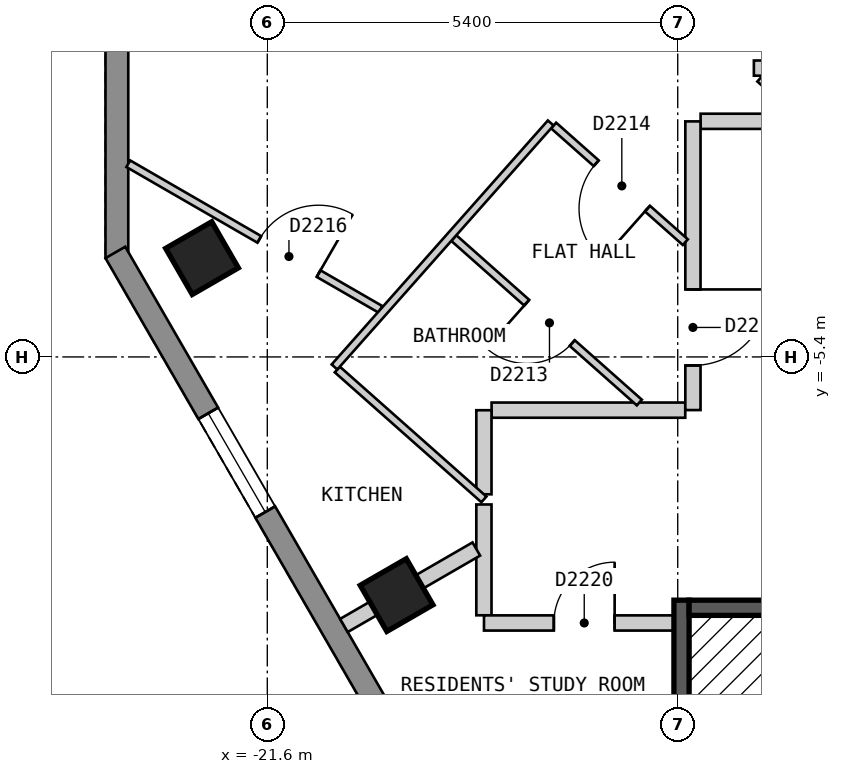
"""IFC4 building model, lengths in metres.
Left out: names, types, materials, properties, quantities, classifications, styles, units other than length and angle.
Written with IfcOpenShell. Run it as: python <this file> out.ifc"""

import sys

from ifc_helpers import new_model, si_unit, direction, frame, frame_2d, origin, origin_2d, place, context, subcontext, project, spatial, polyline, rectangle, outline, extrude, element, fill, save


model = new_model("IFC4")
c1 = context("Model", 3, precision=1e-05, world=origin(), true_north=direction((0.0, 1.0)))
c2 = subcontext(c1, "Body", "Model", "MODEL_VIEW")
j1 = project(units=[si_unit("LENGTHUNIT", "METRE"), si_unit("PLANEANGLEUNIT", "RADIAN")], contexts=[c1])
p1 = place(None, origin())
s1 = spatial("IfcSite", under=j1, at=p1, CompositionType="ELEMENT")
p2 = place(p1, origin())
s2 = spatial("IfcBuilding", under=s1, at=p2, CompositionType="ELEMENT")
p3 = place(p2, frame((0.0, 0.0, 229.8)))
s3 = spatial("IfcBuildingStorey", under=s2, at=p3, CompositionType="ELEMENT", Elevation=229.8)
for number, where, z_axis, x_axis in (
    (1, (-22.459, -4.1, 0.0), (0.0, 0.0, 1.0), (0.5, -0.866, 0.0)),
    (2, (-19.899, -8.533, 0.0), (0.0, 0.0, 1.0), (0.5, -0.866, 0.0)),
):
    element("IfcColumn", number, at=place(p3, frame(where, z_axis=z_axis, x_axis=x_axis)), inside=s3, PredefinedType="COLUMN", context=c2, shape_type="SweptSolid", body=[
        extrude(rectangle(XDim=0.7, YDim=0.7, at=origin_2d()), origin(), (0.0, 0.0, 1.0), 3.0),
    ])
p4 = place(p3, frame((-23.579, 0.9, 0.0), z_axis=(0.0, 0.0, 1.0), x_axis=(0.0, -1.0, 0.0)))
e3 = element("IfcWall", 3, at=p4, inside=s3, PredefinedType="SOLIDWALL", context=c2, shape_type="SweptSolid", body=[
    extrude(outline(polyline([(0.0, -0.15), (5.0, -0.15), (4.92, 0.15), (0.08, 0.15), (0.0, -0.15)])), origin(), (0.0, 0.0, 1.0), 2.7),
])
p5 = place(p4, frame((0.65, 0.0, 0.15)))
e4 = element("IfcOpeningElement", 4, at=p5, cuts=e3, PredefinedType="OPENING", context=c2, shape_type="SweptSolid", body=[
    extrude(rectangle(XDim=1.2, YDim=2.1, at=frame_2d((0.6, 1.05))), frame((0.0, 0.16, 0.0), z_axis=(0.0, -1.0, 0.0), x_axis=(1.0, 0.0, 0.0)), (0.0, 0.0, 1.0), 0.32),
])
p6 = place(p3, frame((-23.599, -4.025, 0.0), z_axis=(0.0, 0.0, 1.0), x_axis=(0.500012653391, -0.866018098222, 0.0)))
e5 = element("IfcWall", 5, at=p6, inside=s3, PredefinedType="SOLIDWALL", context=c2, shape_type="SweptSolid", body=[
    extrude(outline(polyline([(0.0, -0.15), (16.628, -0.15), (16.548, 0.15), (0.08, 0.15), (0.0, -0.15)])), origin(), (0.0, 0.0, 1.0), 2.7),
])
p7 = place(p6, frame((2.444, 0.0, 0.15)))
e6 = element("IfcOpeningElement", 6, at=p7, cuts=e5, PredefinedType="OPENING", context=c2, shape_type="SweptSolid", body=[
    extrude(rectangle(XDim=1.5, YDim=2.1, at=frame_2d((0.75, 1.05))), frame((0.0, 0.16, 0.0), z_axis=(0.0, -1.0, 0.0), x_axis=(1.0, 0.0, 0.0)), (0.0, 0.0, 1.0), 0.32),
])
p8 = place(p6, frame((7.564, 0.0, 0.15)))
e7 = element("IfcOpeningElement", 7, at=p8, cuts=e5, PredefinedType="OPENING", context=c2, shape_type="SweptSolid", body=[
    extrude(rectangle(XDim=1.5, YDim=2.1, at=frame_2d((0.75, 1.05))), frame((0.0, 0.16, 0.0), z_axis=(0.0, -1.0, 0.0), x_axis=(1.0, 0.0, 0.0)), (0.0, 0.0, 1.0), 0.32),
])
p9 = place(p6, frame((12.682, 0.0, 0.15)))
e8 = element("IfcOpeningElement", 8, at=p9, cuts=e5, PredefinedType="OPENING", context=c2, shape_type="SweptSolid", body=[
    extrude(rectangle(XDim=1.5, YDim=2.1, at=frame_2d((0.75, 1.05))), frame((0.0, 0.16, 0.0), z_axis=(0.0, -1.0, 0.0), x_axis=(1.0, 0.0, 0.0)), (0.0, 0.0, 1.0), 0.32),
])
p10 = place(p3, frame((-18.75, -7.341, 0.0), z_axis=(0.0, 0.0, 1.0), x_axis=(0.0, -1.0, 0.0)))
e9 = element("IfcWall", 9, at=p10, inside=s3, PredefinedType="PARTITIONING", context=c2, shape_type="SweptSolid", body=[
    extrude(rectangle(XDim=1.458, YDim=0.2, at=frame_2d((0.729, 0.0))), origin(), (0.0, 0.0, 1.0), 2.7),
])
p11 = place(p3, frame((-18.649, -6.1, 0.0), z_axis=(0.0, 0.0, 1.0), x_axis=(1.0, 0.0, 0.0)))
e10 = element("IfcWall", 10, at=p11, inside=s3, PredefinedType="PARTITIONING", context=c2, shape_type="SweptSolid", body=[
    extrude(rectangle(XDim=2.548, YDim=0.2, at=frame_2d((1.274, 0.0))), origin(), (0.0, 0.0, 1.0), 2.7),
])
p12 = place(p3, frame((-18.749, -8.9, 0.0), z_axis=(0.0, 0.0, 1.0), x_axis=(1.0, 0.0, 0.0)))
e11 = element("IfcWall", 11, at=p12, inside=s3, PredefinedType="PARTITIONING", context=c2, shape_type="SweptSolid", body=[
    extrude(rectangle(XDim=2.699, YDim=0.2, at=frame_2d((1.35, 0.0))), origin(), (0.0, 0.0, 1.0), 2.7),
])
p13 = place(p12, frame((0.919, 0.0, 0.0)))
e12 = element("IfcOpeningElement", 12, at=p13, cuts=e11, PredefinedType="OPENING", context=c2, shape_type="SweptSolid", body=[
    extrude(rectangle(XDim=0.8, YDim=2.1, at=frame_2d((0.4, 1.05))), frame((0.0, 0.11, 0.0), z_axis=(0.0, -1.0, 0.0), x_axis=(1.0, 0.0, 0.0)), (0.0, 0.0, 1.0), 0.22),
])
p14 = place(p3, frame((-15.899, -2.3, 0.0), z_axis=(0.0, 0.0, 1.0), x_axis=(1.0, 0.0, 0.0)))
e13 = element("IfcWall", 13, at=p14, inside=s3, PredefinedType="PARTITIONING", context=c2, shape_type="SweptSolid", body=[
    extrude(rectangle(XDim=1.337, YDim=0.2, at=frame_2d((0.668, 0.0))), origin(), (0.0, 0.0, 1.0), 2.7),
])
p15 = place(p3, frame((-16.0, -6.099, 0.0), z_axis=(0.0, 0.0, 1.0), x_axis=(0.0, 1.0, 0.0)))
e14 = element("IfcWall", 14, at=p15, inside=s3, PredefinedType="PARTITIONING", context=c2, shape_type="SweptSolid", body=[
    extrude(rectangle(XDim=3.798, YDim=0.2, at=frame_2d((1.899, 0.0))), origin(), (0.0, 0.0, 1.0), 2.7),
])
p16 = place(p15, frame((0.587, 0.0, 0.0)))
e15 = element("IfcOpeningElement", 15, at=p16, cuts=e14, PredefinedType="OPENING", context=c2, shape_type="SweptSolid", body=[
    extrude(rectangle(XDim=1.0, YDim=2.1, at=frame_2d((0.5, 1.05))), frame((0.0, 0.11, 0.0), z_axis=(0.0, -1.0, 0.0), x_axis=(1.0, 0.0, 0.0)), (0.0, 0.0, 1.0), 0.22),
])
p17 = place(p3, frame((-18.75, -7.207, 0.0), z_axis=(0.0, 0.0, 1.0), x_axis=(0.0, 1.0, 0.0)))
e16 = element("IfcWall", 16, at=p17, inside=s3, PredefinedType="PARTITIONING", context=c2, shape_type="SweptSolid", body=[
    extrude(rectangle(XDim=1.106, YDim=0.2, at=frame_2d((0.553, 0.0))), origin(), (0.0, 0.0, 1.0), 2.7),
])
p18 = place(p3, frame((-23.429, -2.858, 0.0), z_axis=(0.0, 0.0, 1.0), x_axis=(0.8659754619, -0.500086491905, 0.0)))
e17 = element("IfcWall", 17, at=p18, inside=s3, PredefinedType="PARTITIONING", context=c2, shape_type="SweptSolid", body=[
    extrude(rectangle(XDim=3.831, YDim=0.1, at=frame_2d((1.916, 0.0))), origin(), (0.0, 0.0, 1.0), 2.7),
])
p19 = place(p18, frame((1.991, 0.0, 0.0)))
e18 = element("IfcOpeningElement", 18, at=p19, cuts=e17, PredefinedType="OPENING", context=c2, shape_type="SweptSolid", body=[
    extrude(rectangle(XDim=0.9, YDim=2.1, at=frame_2d((0.45, 1.05))), frame((0.0, 0.06, 0.0), z_axis=(0.0, -1.0, 0.0), x_axis=(1.0, 0.0, 0.0)), (0.0, 0.0, 1.0), 0.12),
])
p20 = place(p3, frame((-17.833, -2.355, 0.0), z_axis=(0.0, 0.0, 1.0), x_axis=(0.748577710953, -0.663047065196, 0.0)))
e19 = element("IfcWall", 19, at=p20, inside=s3, PredefinedType="PARTITIONING", context=c2, shape_type="SweptSolid", body=[
    extrude(rectangle(XDim=2.315, YDim=0.1, at=frame_2d((1.157, 0.0))), origin(), (0.0, 0.0, 1.0), 2.7),
])
p21 = place(p20, frame((0.749, 0.0, 0.0)))
e20 = element("IfcOpeningElement", 20, at=p21, cuts=e19, PredefinedType="OPENING", context=c2, shape_type="SweptSolid", body=[
    extrude(rectangle(XDim=0.9, YDim=2.1, at=frame_2d((0.45, 1.05))), frame((0.0, 0.06, 0.0), z_axis=(0.0, -1.0, 0.0), x_axis=(1.0, 0.0, 0.0)), (0.0, 0.0, 1.0), 0.12),
])
p22 = place(p3, frame((-19.146, -3.836, 0.0), z_axis=(0.0, 0.0, 1.0), x_axis=(0.748267567437, -0.663397051186, 0.0)))
e21 = element("IfcWall", 21, at=p22, inside=s3, PredefinedType="PARTITIONING", context=c2, shape_type="SweptSolid", body=[
    extrude(rectangle(XDim=3.262, YDim=0.1, at=frame_2d((1.631, 0.0))), origin(), (0.0, 0.0, 1.0), 2.7),
])
p23 = place(p22, frame((1.282, 0.0, 0.0)))
e22 = element("IfcOpeningElement", 22, at=p23, cuts=e21, PredefinedType="OPENING", context=c2, shape_type="SweptSolid", body=[
    extrude(rectangle(XDim=0.8, YDim=2.1, at=frame_2d((0.4, 1.05))), frame((0.0, 0.06, 0.0), z_axis=(0.0, -1.0, 0.0), x_axis=(1.0, 0.0, 0.0)), (0.0, 0.0, 1.0), 0.12),
])
p24 = place(p3, frame((-20.679, -5.565, 0.0), z_axis=(0.0, 0.0, 1.0), x_axis=(0.748495475416, -0.663139897217, 0.0)))
e23 = element("IfcWall", 23, at=p24, inside=s3, PredefinedType="PARTITIONING", context=c2, shape_type="SweptSolid", body=[
    extrude(rectangle(XDim=2.577, YDim=0.1, at=frame_2d((1.289, 0.0))), origin(), (0.0, 0.0, 1.0), 2.7),
])
p25 = place(p3, frame((-20.716, -5.532, 0.0), z_axis=(0.0, 0.0, 1.0), x_axis=(0.663278535613, 0.748372623895, 0.0)))
e24 = element("IfcWall", 24, at=p25, inside=s3, PredefinedType="PARTITIONING", context=c2, shape_type="SweptSolid", body=[
    extrude(rectangle(XDim=4.289, YDim=0.1, at=frame_2d((2.145, 0.0))), origin(), (0.0, 0.0, 1.0), 2.7),
])
p26 = place(p3, frame((-15.086, -1.702, 0.0), z_axis=(0.0, 0.0, 1.0), x_axis=(0.748305129876, -0.663354680846, 0.0)))
e25 = element("IfcWall", 25, at=p26, inside=s3, PredefinedType="PARTITIONING", context=c2, shape_type="SweptSolid", body=[
    extrude(rectangle(XDim=0.856, YDim=0.2, at=frame_2d((0.428, 0.0))), origin(), (0.0, 0.0, 1.0), 2.7),
])
p27 = place(p3, frame((-15.198, -1.6, 0.0), z_axis=(0.0, 0.0, 1.0), x_axis=(1.0, 0.0, 0.0)))
e26 = element("IfcWall", 26, at=p27, inside=s3, PredefinedType="PARTITIONING", context=c2, shape_type="SweptSolid", body=[
    extrude(rectangle(XDim=2.005, YDim=0.2, at=frame_2d((1.002, 0.0))), origin(), (0.0, 0.0, 1.0), 2.7),
])
p28 = place(p3, frame((-20.592, -8.933, 0.0), z_axis=(0.0, 0.0, 1.0), x_axis=(0.865941000796, 0.500146161777, 0.0)))
e27 = element("IfcWall", 27, at=p28, inside=s3, PredefinedType="PARTITIONING", context=c2, shape_type="SweptSolid", body=[
    extrude(rectangle(XDim=2.012, YDim=0.2, at=frame_2d((1.006, 0.0))), origin(), (0.0, 0.0, 1.0), 2.7),
])
p29 = place(p3, frame((-16.15, -14.4, 0.0), z_axis=(0.0, 0.0, 1.0), x_axis=(0.0, 1.0, 0.0)))
e28 = element("IfcWall", 28, at=p29, inside=s3, PredefinedType="SOLIDWALL", context=c2, shape_type="SweptSolid", body=[
    extrude(rectangle(XDim=5.8, YDim=0.2, at=frame_2d((2.9, 0.0))), origin(), (0.0, 0.0, 1.0), 2.7),
])
p30 = place(p3, frame((-16.05, -8.7, 0.0), z_axis=(0.0, 0.0, 1.0), x_axis=(1.0, 0.0, 0.0)))
e29 = element("IfcWall", 29, at=p30, inside=s3, PredefinedType="SOLIDWALL", context=c2, shape_type="SweptSolid", body=[
    extrude(rectangle(XDim=2.75, YDim=0.2, at=frame_2d((1.375, 0.0))), origin(), (0.0, 0.0, 1.0), 2.7),
])
p31 = place(p7, origin())
e30 = element("IfcWindow", 30, at=p31, inside=s3, PartitioningType="SINGLE_PANEL", PredefinedType="WINDOW", context=c2, shape_type="SweptSolid", body=[
    extrude(rectangle(XDim=1.5, YDim=2.1, at=frame_2d((0.75, 1.05))), frame((0.0, 0.03, 0.0), z_axis=(0.0, -1.0, 0.0), x_axis=(1.0, 0.0, 0.0)), (0.0, 0.0, 1.0), 0.06),
])
fill(e6, e30)
p32 = place(p16, origin())
e31 = element("IfcDoor", 31, at=p32, inside=s3, OperationType="SINGLE_SWING_RIGHT", PredefinedType="DOOR", context=c2, shape_type="SweptSolid", body=[
    extrude(rectangle(XDim=1.0, YDim=2.1, at=frame_2d((0.5, 1.05))), frame((0.0, 0.025, 0.0), z_axis=(0.0, -1.0, 0.0), x_axis=(1.0, 0.0, 0.0)), (0.0, 0.0, 1.0), 0.05),
])
fill(e15, e31)
p33 = place(p23, origin())
e32 = element("IfcDoor", 32, at=p33, inside=s3, OperationType="SINGLE_SWING_LEFT", PredefinedType="DOOR", context=c2, shape_type="SweptSolid", body=[
    extrude(rectangle(XDim=0.8, YDim=2.1, at=frame_2d((0.4, 1.05))), frame((0.0, 0.025, 0.0), z_axis=(0.0, -1.0, 0.0), x_axis=(1.0, 0.0, 0.0)), (0.0, 0.0, 1.0), 0.05),
])
fill(e22, e32)
p34 = place(p21, origin())
e33 = element("IfcDoor", 33, at=p34, inside=s3, OperationType="SINGLE_SWING_RIGHT", PredefinedType="DOOR", context=c2, shape_type="SweptSolid", body=[
    extrude(rectangle(XDim=0.9, YDim=2.1, at=frame_2d((0.45, 1.05))), frame((0.0, 0.025, 0.0), z_axis=(0.0, -1.0, 0.0), x_axis=(1.0, 0.0, 0.0)), (0.0, 0.0, 1.0), 0.05),
])
fill(e20, e33)
p35 = place(p19, origin())
e34 = element("IfcDoor", 34, at=p35, inside=s3, OperationType="SINGLE_SWING_RIGHT", PredefinedType="DOOR", context=c2, shape_type="SweptSolid", body=[
    extrude(rectangle(XDim=0.9, YDim=2.1, at=frame_2d((0.45, 1.05))), frame((0.0, 0.025, 0.0), z_axis=(0.0, -1.0, 0.0), x_axis=(1.0, 0.0, 0.0)), (0.0, 0.0, 1.0), 0.05),
])
fill(e18, e34)
p36 = place(p13, origin())
e35 = element("IfcDoor", 35, at=p36, inside=s3, OperationType="SINGLE_SWING_RIGHT", PredefinedType="DOOR", context=c2, shape_type="SweptSolid", body=[
    extrude(rectangle(XDim=0.8, YDim=2.1, at=frame_2d((0.4, 1.05))), frame((0.0, 0.025, 0.0), z_axis=(0.0, -1.0, 0.0), x_axis=(1.0, 0.0, 0.0)), (0.0, 0.0, 1.0), 0.05),
])
fill(e12, e35)
save(model, sys.argv[1])
